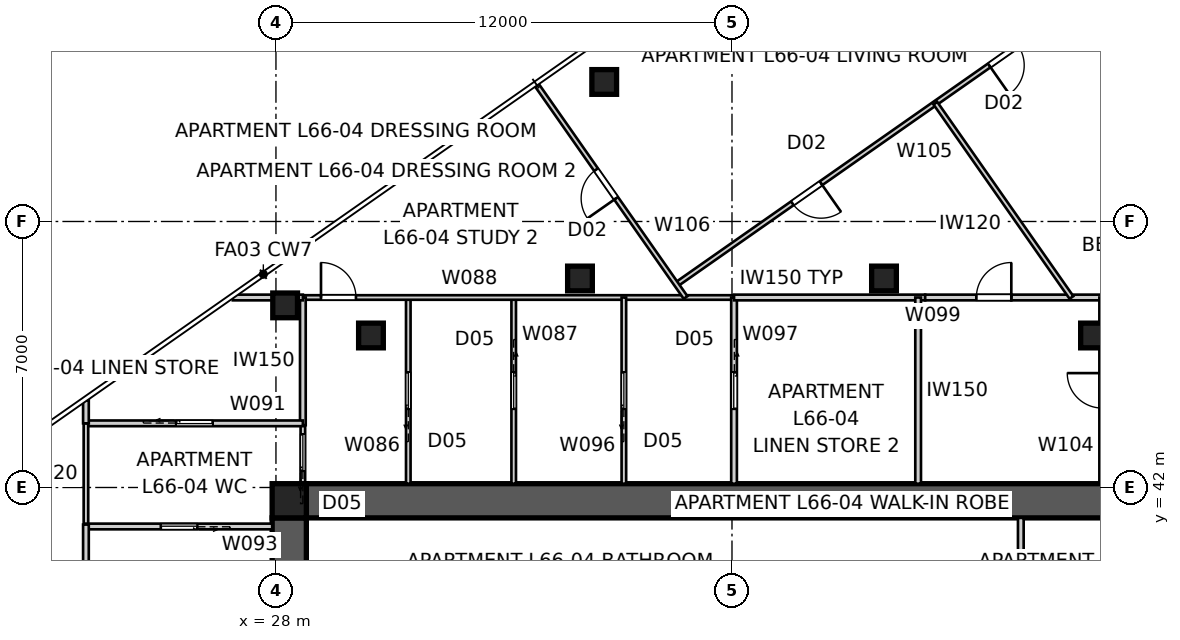
"""IFC4 building model, lengths in metres.
Left out: names, types, materials, properties, quantities, classifications, styles, units other than length and angle.
Written with IfcOpenShell. Run it as: python <this file> out.ifc"""

import sys

from ifc_helpers import new_model, si_unit, direction, frame, frame_2d, origin, origin_2d, place, context, subcontext, project, spatial, polyline, rectangle, outline, extrude, element, fill, save


model = new_model("IFC4")
c1 = context("Model", 3, precision=1e-05, world=origin(), true_north=direction((0.0, 1.0)))
c2 = subcontext(c1, "Body", "Model", "MODEL_VIEW")
j1 = project(units=[si_unit("LENGTHUNIT", "METRE"), si_unit("PLANEANGLEUNIT", "RADIAN")], contexts=[c1])
p1 = place(None, origin())
s1 = spatial("IfcSite", under=j1, at=p1, CompositionType="ELEMENT")
p2 = place(p1, origin())
s2 = spatial("IfcBuilding", under=s1, at=p2, CompositionType="ELEMENT")
p3 = place(p2, frame((0.0, 0.0, 240.4)))
s3 = spatial("IfcBuildingStorey", under=s2, at=p3, CompositionType="ELEMENT", Elevation=240.4)
p4 = place(p3, frame((28.8, 41.65, 0.0), z_axis=(0.0, 0.0, 1.0), x_axis=(1.0, 0.0, 0.0)))
e1 = element("IfcWall", 1, at=p4, inside=s3, PredefinedType="SHEAR", context=c2, shape_type="SweptSolid", body=[
    extrude(outline(polyline([(0.0, -0.45), (22.4, -0.45), (22.4, -0.025), (22.85, -0.025), (22.85, 0.025), (22.4, 0.025), (22.4, 0.45), (0.0, 0.45), (0.0, 0.025), (-0.45, 0.025), (-0.45, -0.025), (0.0, -0.025), (0.0, -0.45)])), origin(), (0.0, 0.0, 1.0), 3.4),
])
p5 = place(p3, frame((28.35, 41.2, 0.0), z_axis=(0.0, 0.0, 1.0), x_axis=(0.0, -1.0, 0.0)))
e2 = element("IfcWall", 2, at=p5, inside=s3, PredefinedType="SHEAR", context=c2, shape_type="SweptSolid", body=[
    extrude(outline(polyline([(0.0, -0.45), (22.4, -0.45), (22.4, -0.025), (22.85, -0.025), (22.85, 0.025), (22.4, 0.025), (22.4, 0.45), (0.0, 0.45), (0.0, 0.025), (-0.45, 0.025), (-0.45, -0.025), (0.0, -0.025), (0.0, -0.45)])), origin(), (0.0, 0.0, 1.0), 3.4),
])
p6 = place(p5, frame((11.14, 0.0, 0.0)))
e3 = element("IfcOpeningElement", 3, at=p6, cuts=e2, PredefinedType="OPENING", context=c2, shape_type="SweptSolid", body=[
    extrude(rectangle(XDim=1.02, YDim=2.4, at=frame_2d((0.51, 1.2))), frame((0.0, 0.46, 0.0), z_axis=(0.0, -1.0, 0.0), x_axis=(1.0, 0.0, 0.0)), (0.0, 0.0, 1.0), 0.92),
])
p7 = place(p3, frame((28.35, 41.65, 0.0), z_axis=(0.0, 0.0, 1.0), x_axis=(1.0, 0.0, 0.0)))
e4 = element("IfcColumn", 4, at=p7, inside=s3, PredefinedType="COLUMN", context=c2, shape_type="SweptSolid", body=[
    extrude(rectangle(XDim=0.9, YDim=0.9, at=origin_2d()), origin(), (0.0, 0.0, 1.0), 3.4),
])
for number, where, z_axis, x_axis in (
    (5, (36.638, 52.672, -0.15), (0.0, 0.0, 1.0), (1.0, 0.0, 0.0)),
    (6, (28.242, 46.793, -0.15), (0.0, 0.0, 1.0), (1.0, 0.0, 0.0)),
):
    element("IfcColumn", number, at=place(p3, frame(where, z_axis=z_axis, x_axis=x_axis)), inside=s3, PredefinedType="COLUMN", context=c2, shape_type="SweptSolid", body=[
        extrude(rectangle(XDim=0.65, YDim=0.65, at=origin_2d()), origin(), (0.0, 0.0, 1.0), 3.55),
    ])
for number, where, z_axis, x_axis in (
    (7, (49.5, 46.0, 0.0), (0.0, 0.0, 1.0), (1.0, 0.0, 0.0)),
    (8, (44.0, 47.5, 0.0), (0.0, 0.0, 1.0), (1.0, 0.0, 0.0)),
    (9, (36.0, 47.5, 0.0), (0.0, 0.0, 1.0), (1.0, 0.0, 0.0)),
    (10, (30.5, 46.0, 0.0), (0.0, 0.0, 1.0), (1.0, 0.0, 0.0)),
):
    element("IfcColumn", number, at=place(p3, frame(where, z_axis=z_axis, x_axis=x_axis)), inside=s3, PredefinedType="COLUMN", context=c2, shape_type="SweptSolid", body=[
        extrude(rectangle(XDim=0.65, YDim=0.65, at=origin_2d()), origin(), (0.0, 0.0, 1.0), 3.4),
    ])
p8 = place(p3, frame((47.6, 41.2, 0.0), z_axis=(0.0, 0.0, 1.0), x_axis=(0.0, -1.0, 0.0)))
e11 = element("IfcWall", 11, at=p8, inside=s3, PredefinedType="SOLIDWALL", context=c2, shape_type="SweptSolid", body=[
    extrude(rectangle(XDim=5.9, YDim=0.15, at=frame_2d((2.95, 0.0))), origin(), (0.0, 0.0, 1.0), 3.25),
])
p9 = place(p3, frame((31.482, 42.1, 0.0), z_axis=(0.0, 0.0, 1.0), x_axis=(0.0, 1.0, 0.0)))
e12 = element("IfcWall", 12, at=p9, inside=s3, PredefinedType="PARTITIONING", context=c2, shape_type="SweptSolid", body=[
    extrude(rectangle(XDim=4.9, YDim=0.12, at=frame_2d((2.45, 0.0))), origin(), (0.0, 0.0, 1.0), 3.25),
])
p10 = place(p9, frame((1.97, 0.0, 0.0)))
e13 = element("IfcOpeningElement", 13, at=p10, cuts=e12, PredefinedType="OPENING", context=c2, shape_type="SweptSolid", body=[
    extrude(rectangle(XDim=0.96, YDim=2.1, at=frame_2d((0.48, 1.05))), frame((0.0, 0.07, 0.0), z_axis=(0.0, -1.0, 0.0), x_axis=(1.0, 0.0, 0.0)), (0.0, 0.0, 1.0), 0.14),
])
p11 = place(p3, frame((34.256, 47.0, 0.0), z_axis=(0.0, 0.0, 1.0), x_axis=(0.0, -1.0, 0.0)))
e14 = element("IfcWall", 14, at=p11, inside=s3, PredefinedType="PARTITIONING", context=c2, shape_type="SweptSolid", body=[
    extrude(rectangle(XDim=4.9, YDim=0.12, at=frame_2d((2.45, 0.0))), origin(), (0.0, 0.0, 1.0), 2.796),
])
p12 = place(p11, frame((1.97, 0.0, 0.0)))
e15 = element("IfcOpeningElement", 15, at=p12, cuts=e14, PredefinedType="OPENING", context=c2, shape_type="SweptSolid", body=[
    extrude(rectangle(XDim=0.96, YDim=2.1, at=frame_2d((0.48, 1.05))), frame((0.0, 0.07, 0.0), z_axis=(0.0, -1.0, 0.0), x_axis=(1.0, 0.0, 0.0)), (0.0, 0.0, 1.0), 0.14),
])
p13 = place(p3, frame((28.708, 47.0, 0.0), z_axis=(0.0, 0.0, 1.0), x_axis=(1.0, 0.0, 0.0)))
e16 = element("IfcWall", 16, at=p13, inside=s3, PredefinedType="PARTITIONING", context=c2, shape_type="SweptSolid", body=[
    extrude(rectangle(XDim=11.346, YDim=0.12, at=frame_2d((5.673, 0.0))), origin(), (0.0, 0.0, 1.0), 2.55),
])
p14 = place(p13, frame((0.477, 0.0, 0.0)))
e17 = element("IfcOpeningElement", 17, at=p14, cuts=e16, PredefinedType="OPENING", context=c2, shape_type="SweptSolid", body=[
    extrude(rectangle(XDim=0.92, YDim=2.34, at=frame_2d((0.46, 1.17))), frame((0.0, 0.07, 0.0), z_axis=(0.0, -1.0, 0.0), x_axis=(1.0, 0.0, 0.0)), (0.0, 0.0, 1.0), 0.14),
])
p15 = place(p3, frame((28.708, 41.18, 0.0), z_axis=(0.0, 0.0, 1.0), x_axis=(0.0, 1.0, 0.0)))
e18 = element("IfcWall", 18, at=p15, inside=s3, PredefinedType="PARTITIONING", context=c2, shape_type="SweptSolid", body=[
    extrude(rectangle(XDim=2.458, YDim=0.12, at=frame_2d((1.229, 0.0))), origin(), (0.0, 0.0, 1.0), 3.25),
])
p16 = place(p15, frame((1.259, 0.0, 0.0)))
e19 = element("IfcOpeningElement", 19, at=p16, cuts=e18, PredefinedType="OPENING", context=c2, shape_type="SweptSolid", body=[
    extrude(rectangle(XDim=0.96, YDim=2.1, at=frame_2d((0.48, 1.05))), frame((0.0, 0.07, 0.0), z_axis=(0.0, -1.0, 0.0), x_axis=(1.0, 0.0, 0.0)), (0.0, 0.0, 1.0), 0.14),
])
p17 = place(p3, frame((28.708, 43.638, 0.0), z_axis=(0.0, 0.0, 1.0), x_axis=(0.0, 1.0, 0.0)))
e20 = element("IfcWall", 20, at=p17, inside=s3, PredefinedType="SOLIDWALL", context=c2, shape_type="SweptSolid", body=[
    extrude(rectangle(XDim=3.362, YDim=0.15, at=frame_2d((1.681, 0.0))), origin(), (0.0, 0.0, 1.0), 3.25),
])
p18 = place(p3, frame((23.0, 43.688, 0.0), z_axis=(0.0, 0.0, 1.0), x_axis=(1.0, 0.0, 0.0)))
e21 = element("IfcWall", 21, at=p18, inside=s3, PredefinedType="SOLIDWALL", context=c2, shape_type="SweptSolid", body=[
    extrude(rectangle(XDim=5.708, YDim=0.15, at=frame_2d((2.854, 0.0))), origin(), (0.0, 0.0, 1.0), 3.25),
])
p19 = place(p18, frame((2.374, 0.0, 0.0)))
e22 = element("IfcOpeningElement", 22, at=p19, cuts=e21, PredefinedType="OPENING", context=c2, shape_type="SweptSolid", body=[
    extrude(rectangle(XDim=0.96, YDim=2.1, at=frame_2d((0.48, 1.05))), frame((0.0, 0.085, 0.0), z_axis=(0.0, -1.0, 0.0), x_axis=(1.0, 0.0, 0.0)), (0.0, 0.0, 1.0), 0.17),
])
p20 = place(p3, frame((23.0, 41.024, 0.0), z_axis=(0.0, 0.0, 1.0), x_axis=(0.0, 1.0, 0.0)))
e23 = element("IfcWall", 23, at=p20, inside=s3, PredefinedType="PARTITIONING", context=c2, shape_type="SweptSolid", body=[
    extrude(rectangle(XDim=2.665, YDim=0.12, at=frame_2d((1.332, 0.0))), origin(), (0.0, 0.0, 1.0), 3.25),
])
p21 = place(p3, frame((27.9, 40.974, 0.0), z_axis=(0.0, 0.0, 1.0), x_axis=(-1.0, 0.0, 0.0)))
e24 = element("IfcWall", 24, at=p21, inside=s3, PredefinedType="SOLIDWALL", context=c2, shape_type="SweptSolid", body=[
    extrude(rectangle(XDim=4.9, YDim=0.15, at=frame_2d((2.45, 0.0))), origin(), (0.0, 0.0, 1.0), 3.25),
])
p22 = place(p21, frame((1.97, 0.0, 0.0)))
e25 = element("IfcOpeningElement", 25, at=p22, cuts=e24, PredefinedType="OPENING", context=c2, shape_type="SweptSolid", body=[
    extrude(rectangle(XDim=0.96, YDim=2.1, at=frame_2d((0.48, 1.05))), frame((0.0, 0.085, 0.0), z_axis=(0.0, -1.0, 0.0), x_axis=(1.0, 0.0, 0.0)), (0.0, 0.0, 1.0), 0.17),
])
p23 = place(p3, frame((23.0, 43.688, 0.0), z_axis=(0.0, 0.0, 1.0), x_axis=(0.0, 1.0, 0.0)))
e26 = element("IfcWall", 26, at=p23, inside=s3, PredefinedType="SOLIDWALL", context=c2, shape_type="SweptSolid", body=[
    extrude(rectangle(XDim=0.606, YDim=0.15, at=frame_2d((0.303, 0.0))), origin(), (0.0, 0.0, 1.0), 3.25),
])
p24 = place(p3, frame((26.864, 47.0, 0.0), z_axis=(0.0, 0.0, 1.0), x_axis=(1.0, 0.0, 0.0)))
e27 = element("IfcWall", 27, at=p24, inside=s3, PredefinedType="SOLIDWALL", context=c2, shape_type="SweptSolid", body=[
    extrude(rectangle(XDim=1.844, YDim=0.15, at=frame_2d((0.922, 0.0))), origin(), (0.0, 0.0, 1.0), 3.25),
])
p25 = place(p3, frame((37.155, 42.1, 0.0), z_axis=(0.0, 0.0, 1.0), x_axis=(0.0, 1.0, 0.0)))
e28 = element("IfcWall", 28, at=p25, inside=s3, PredefinedType="PARTITIONING", context=c2, shape_type="SweptSolid", body=[
    extrude(rectangle(XDim=4.9, YDim=0.12, at=frame_2d((2.45, 0.0))), origin(), (0.0, 0.0, 1.0), 2.796),
])
p26 = place(p25, frame((1.97, 0.0, 0.0)))
e29 = element("IfcOpeningElement", 29, at=p26, cuts=e28, PredefinedType="OPENING", context=c2, shape_type="SweptSolid", body=[
    extrude(rectangle(XDim=0.96, YDim=2.1, at=frame_2d((0.48, 1.05))), frame((0.0, 0.07, 0.0), z_axis=(0.0, -1.0, 0.0), x_axis=(1.0, 0.0, 0.0)), (0.0, 0.0, 1.0), 0.14),
])
p27 = place(p3, frame((40.054, 47.0, 0.0), z_axis=(0.0, 0.0, 1.0), x_axis=(0.0, -1.0, 0.0)))
e30 = element("IfcWall", 30, at=p27, inside=s3, PredefinedType="SOLIDWALL", context=c2, shape_type="SweptSolid", body=[
    extrude(rectangle(XDim=4.9, YDim=0.15, at=frame_2d((2.45, 0.0))), origin(), (0.0, 0.0, 1.0), 2.796),
])
p28 = place(p27, frame((1.97, 0.0, 0.0)))
e31 = element("IfcOpeningElement", 31, at=p28, cuts=e30, PredefinedType="OPENING", context=c2, shape_type="SweptSolid", body=[
    extrude(rectangle(XDim=0.96, YDim=2.1, at=frame_2d((0.48, 1.05))), frame((0.0, 0.085, 0.0), z_axis=(0.0, -1.0, 0.0), x_axis=(1.0, 0.0, 0.0)), (0.0, 0.0, 1.0), 0.17),
])
p29 = place(p3, frame((40.054, 47.0, 0.0), z_axis=(0.0, 0.0, 1.0), x_axis=(1.0, 0.0, 0.0)))
e32 = element("IfcWall", 32, at=p29, inside=s3, PredefinedType="SOLIDWALL", context=c2, shape_type="SweptSolid", body=[
    extrude(rectangle(XDim=5.029, YDim=0.15, at=frame_2d((2.515, 0.0))), origin(), (0.0, 0.0, 1.0), 3.25),
])
p30 = place(p3, frame((45.083, 47.0, 0.0), z_axis=(0.0, 0.0, 1.0), x_axis=(1.0, 0.0, 0.0)))
e33 = element("IfcWall", 33, at=p30, inside=s3, PredefinedType="SOLIDWALL", context=c2, shape_type="SweptSolid", body=[
    extrude(rectangle(XDim=2.267, YDim=0.15, at=frame_2d((1.133, 0.0))), origin(), (0.0, 0.0, 1.0), 2.55),
])
p31 = place(p30, frame((1.347, 0.0, 0.0)))
e34 = element("IfcOpeningElement", 34, at=p31, cuts=e33, PredefinedType="OPENING", context=c2, shape_type="SweptSolid", body=[
    extrude(rectangle(XDim=0.92, YDim=2.34, at=frame_2d((0.46, 1.17))), frame((0.0, 0.085, 0.0), z_axis=(0.0, -1.0, 0.0), x_axis=(1.0, 0.0, 0.0)), (0.0, 0.0, 1.0), 0.17),
])
p32 = place(p3, frame((47.35, 47.0, 0.0), z_axis=(0.0, 0.0, 1.0), x_axis=(1.0, 0.0, 0.0)))
e35 = element("IfcWall", 35, at=p32, inside=s3, PredefinedType="SOLIDWALL", context=c2, shape_type="SweptSolid", body=[
    extrude(rectangle(XDim=2.442, YDim=0.15, at=frame_2d((1.221, 0.0))), origin(), (0.0, 0.0, 1.0), 3.25),
])
p33 = place(p3, frame((44.898, 47.0, 0.0), z_axis=(0.0, 0.0, 1.0), x_axis=(0.0, -1.0, 0.0)))
e36 = element("IfcWall", 36, at=p33, inside=s3, PredefinedType="SOLIDWALL", context=c2, shape_type="SweptSolid", body=[
    extrude(rectangle(XDim=4.9, YDim=0.15, at=frame_2d((2.45, 0.0))), origin(), (0.0, 0.0, 1.0), 3.25),
])
p34 = place(p3, frame((49.742, 42.1, 0.0), z_axis=(0.0, 0.0, 1.0), x_axis=(0.0, 1.0, 0.0)))
e37 = element("IfcWall", 37, at=p34, inside=s3, PredefinedType="SOLIDWALL", context=c2, shape_type="SweptSolid", body=[
    extrude(rectangle(XDim=4.9, YDim=0.15, at=frame_2d((2.45, 0.0))), origin(), (0.0, 0.0, 1.0), 3.25),
])
p35 = place(p34, frame((1.99, 0.0, 0.0)))
e38 = element("IfcOpeningElement", 38, at=p35, cuts=e37, PredefinedType="OPENING", context=c2, shape_type="SweptSolid", body=[
    extrude(rectangle(XDim=0.92, YDim=2.34, at=frame_2d((0.46, 1.17))), frame((0.0, 0.085, 0.0), z_axis=(0.0, -1.0, 0.0), x_axis=(1.0, 0.0, 0.0)), (0.0, 0.0, 1.0), 0.17),
])
p36 = place(p3, frame((48.949, 54.633, 0.0), z_axis=(0.0, 0.0, 1.0), x_axis=(-0.819155207289, -0.573571919092, 0.0)))
e39 = element("IfcWall", 39, at=p36, inside=s3, PredefinedType="PARTITIONING", context=c2, shape_type="SweptSolid", body=[
    extrude(rectangle(XDim=12.71, YDim=0.12, at=frame_2d((6.355, 0.0))), origin(), (0.0, 0.0, 1.0), 3.25),
])
p37 = place(p36, frame((8.066, 0.0, 0.0)))
e40 = element("IfcOpeningElement", 40, at=p37, cuts=e39, PredefinedType="OPENING", context=c2, shape_type="SweptSolid", body=[
    extrude(rectangle(XDim=0.92, YDim=2.34, at=frame_2d((0.46, 1.17))), frame((0.0, 0.07, 0.0), z_axis=(0.0, -1.0, 0.0), x_axis=(1.0, 0.0, 0.0)), (0.0, 0.0, 1.0), 0.14),
])
p38 = place(p36, frame((1.741, 0.0, 0.0)))
e41 = element("IfcOpeningElement", 41, at=p38, cuts=e39, PredefinedType="OPENING", context=c2, shape_type="SweptSolid", body=[
    extrude(rectangle(XDim=0.92, YDim=2.34, at=frame_2d((0.46, 1.17))), frame((0.0, 0.07, 0.0), z_axis=(0.0, -1.0, 0.0), x_axis=(1.0, 0.0, 0.0)), (0.0, 0.0, 1.0), 0.14),
])
p39 = place(p3, frame((38.778, 47.0, 0.0), z_axis=(0.0, 0.0, 1.0), x_axis=(-0.57357503053, 0.819153028653, 0.0)))
e42 = element("IfcWall", 42, at=p39, inside=s3, PredefinedType="PARTITIONING", context=c2, shape_type="SweptSolid", body=[
    extrude(rectangle(XDim=6.834, YDim=0.12, at=frame_2d((3.417, 0.0))), origin(), (0.0, 0.0, 1.0), 3.25),
])
p40 = place(p39, frame((3.186, 0.0, 0.0)))
e43 = element("IfcOpeningElement", 43, at=p40, cuts=e42, PredefinedType="OPENING", context=c2, shape_type="SweptSolid", body=[
    extrude(rectangle(XDim=0.92, YDim=2.34, at=frame_2d((0.46, 1.17))), frame((0.0, 0.07, 0.0), z_axis=(0.0, -1.0, 0.0), x_axis=(1.0, 0.0, 0.0)), (0.0, 0.0, 1.0), 0.14),
])
p41 = place(p3, frame((23.0, 41.024, 0.0), z_axis=(0.0, 0.0, 1.0), x_axis=(0.0, -1.0, 0.0)))
e44 = element("IfcWall", 44, at=p41, inside=s3, PredefinedType="SOLIDWALL", context=c2, shape_type="SweptSolid", body=[
    extrude(rectangle(XDim=4.879, YDim=0.15, at=frame_2d((2.44, 0.0))), origin(), (0.0, 0.0, 1.0), 3.25),
])
p42 = place(p3, frame((48.932, 47.0, 0.0), z_axis=(0.0, 0.0, 1.0), x_axis=(-0.573569946952, 0.819156588177, 0.0)))
e45 = element("IfcWall", 45, at=p42, inside=s3, PredefinedType="PARTITIONING", context=c2, shape_type="SweptSolid", body=[
    extrude(rectangle(XDim=6.243, YDim=0.12, at=frame_2d((3.122, 0.0))), origin(), (0.0, 0.0, 1.0), 3.25),
])
p43 = place(p22, origin())
e46 = element("IfcDoor", 46, at=p43, inside=s3, OperationType="SLIDING_TO_LEFT", PredefinedType="DOOR", context=c2, shape_type="SweptSolid", body=[
    extrude(rectangle(XDim=0.96, YDim=2.1, at=frame_2d((0.48, 1.05))), frame((0.0, 0.025, 0.0), z_axis=(0.0, -1.0, 0.0), x_axis=(1.0, 0.0, 0.0)), (0.0, 0.0, 1.0), 0.05),
])
fill(e25, e46)
p44 = place(p19, origin())
e47 = element("IfcDoor", 47, at=p44, inside=s3, OperationType="SLIDING_TO_LEFT", PredefinedType="DOOR", context=c2, shape_type="SweptSolid", body=[
    extrude(rectangle(XDim=0.96, YDim=2.1, at=frame_2d((0.48, 1.05))), frame((0.0, 0.025, 0.0), z_axis=(0.0, -1.0, 0.0), x_axis=(1.0, 0.0, 0.0)), (0.0, 0.0, 1.0), 0.05),
])
fill(e22, e47)
p45 = place(p16, origin())
e48 = element("IfcDoor", 48, at=p45, inside=s3, OperationType="SLIDING_TO_LEFT", PredefinedType="DOOR", context=c2, shape_type="SweptSolid", body=[
    extrude(rectangle(XDim=0.96, YDim=2.1, at=frame_2d((0.48, 1.05))), frame((0.0, 0.025, 0.0), z_axis=(0.0, -1.0, 0.0), x_axis=(1.0, 0.0, 0.0)), (0.0, 0.0, 1.0), 0.05),
])
fill(e19, e48)
p46 = place(p10, origin())
e49 = element("IfcDoor", 49, at=p46, inside=s3, OperationType="SLIDING_TO_LEFT", PredefinedType="DOOR", context=c2, shape_type="SweptSolid", body=[
    extrude(rectangle(XDim=0.96, YDim=2.1, at=frame_2d((0.48, 1.05))), frame((0.0, 0.025, 0.0), z_axis=(0.0, -1.0, 0.0), x_axis=(1.0, 0.0, 0.0)), (0.0, 0.0, 1.0), 0.05),
])
fill(e13, e49)
p47 = place(p14, origin())
e50 = element("IfcDoor", 50, at=p47, inside=s3, OperationType="SINGLE_SWING_LEFT", PredefinedType="DOOR", context=c2, shape_type="SweptSolid", body=[
    extrude(rectangle(XDim=0.92, YDim=2.34, at=frame_2d((0.46, 1.17))), frame((0.0, 0.025, 0.0), z_axis=(0.0, -1.0, 0.0), x_axis=(1.0, 0.0, 0.0)), (0.0, 0.0, 1.0), 0.05),
])
fill(e17, e50)
p48 = place(p12, origin())
e51 = element("IfcDoor", 51, at=p48, inside=s3, OperationType="SLIDING_TO_LEFT", PredefinedType="DOOR", context=c2, shape_type="SweptSolid", body=[
    extrude(rectangle(XDim=0.96, YDim=2.1, at=frame_2d((0.48, 1.05))), frame((0.0, 0.025, 0.0), z_axis=(0.0, -1.0, 0.0), x_axis=(1.0, 0.0, 0.0)), (0.0, 0.0, 1.0), 0.05),
])
fill(e15, e51)
p49 = place(p40, origin())
e52 = element("IfcDoor", 52, at=p49, inside=s3, OperationType="SINGLE_SWING_LEFT", PredefinedType="DOOR", context=c2, shape_type="SweptSolid", body=[
    extrude(rectangle(XDim=0.92, YDim=2.34, at=frame_2d((0.46, 1.17))), frame((0.0, 0.025, 0.0), z_axis=(0.0, -1.0, 0.0), x_axis=(1.0, 0.0, 0.0)), (0.0, 0.0, 1.0), 0.05),
])
fill(e43, e52)
p50 = place(p26, origin())
e53 = element("IfcDoor", 53, at=p50, inside=s3, OperationType="SLIDING_TO_LEFT", PredefinedType="DOOR", context=c2, shape_type="SweptSolid", body=[
    extrude(rectangle(XDim=0.96, YDim=2.1, at=frame_2d((0.48, 1.05))), frame((0.0, 0.025, 0.0), z_axis=(0.0, -1.0, 0.0), x_axis=(1.0, 0.0, 0.0)), (0.0, 0.0, 1.0), 0.05),
])
fill(e29, e53)
p51 = place(p37, origin())
e54 = element("IfcDoor", 54, at=p51, inside=s3, OperationType="SINGLE_SWING_LEFT", PredefinedType="DOOR", context=c2, shape_type="SweptSolid", body=[
    extrude(rectangle(XDim=0.92, YDim=2.34, at=frame_2d((0.46, 1.17))), frame((0.0, 0.025, 0.0), z_axis=(0.0, -1.0, 0.0), x_axis=(1.0, 0.0, 0.0)), (0.0, 0.0, 1.0), 0.05),
])
fill(e40, e54)
p52 = place(p38, origin())
e55 = element("IfcDoor", 55, at=p52, inside=s3, OperationType="SINGLE_SWING_RIGHT", PredefinedType="DOOR", context=c2, shape_type="SweptSolid", body=[
    extrude(rectangle(XDim=0.92, YDim=2.34, at=frame_2d((0.46, 1.17))), frame((0.0, 0.025, 0.0), z_axis=(0.0, -1.0, 0.0), x_axis=(1.0, 0.0, 0.0)), (0.0, 0.0, 1.0), 0.05),
])
fill(e41, e55)
p53 = place(p28, origin())
e56 = element("IfcDoor", 56, at=p53, inside=s3, OperationType="SLIDING_TO_LEFT", PredefinedType="DOOR", context=c2, shape_type="SweptSolid", body=[
    extrude(rectangle(XDim=0.96, YDim=2.1, at=frame_2d((0.48, 1.05))), frame((0.0, 0.025, 0.0), z_axis=(0.0, -1.0, 0.0), x_axis=(1.0, 0.0, 0.0)), (0.0, 0.0, 1.0), 0.05),
])
fill(e31, e56)
p54 = place(p31, origin())
e57 = element("IfcDoor", 57, at=p54, inside=s3, OperationType="SINGLE_SWING_RIGHT", PredefinedType="DOOR", context=c2, shape_type="SweptSolid", body=[
    extrude(rectangle(XDim=0.92, YDim=2.34, at=frame_2d((0.46, 1.17))), frame((0.0, 0.025, 0.0), z_axis=(0.0, -1.0, 0.0), x_axis=(1.0, 0.0, 0.0)), (0.0, 0.0, 1.0), 0.05),
])
fill(e34, e57)
save(model, sys.argv[1])
